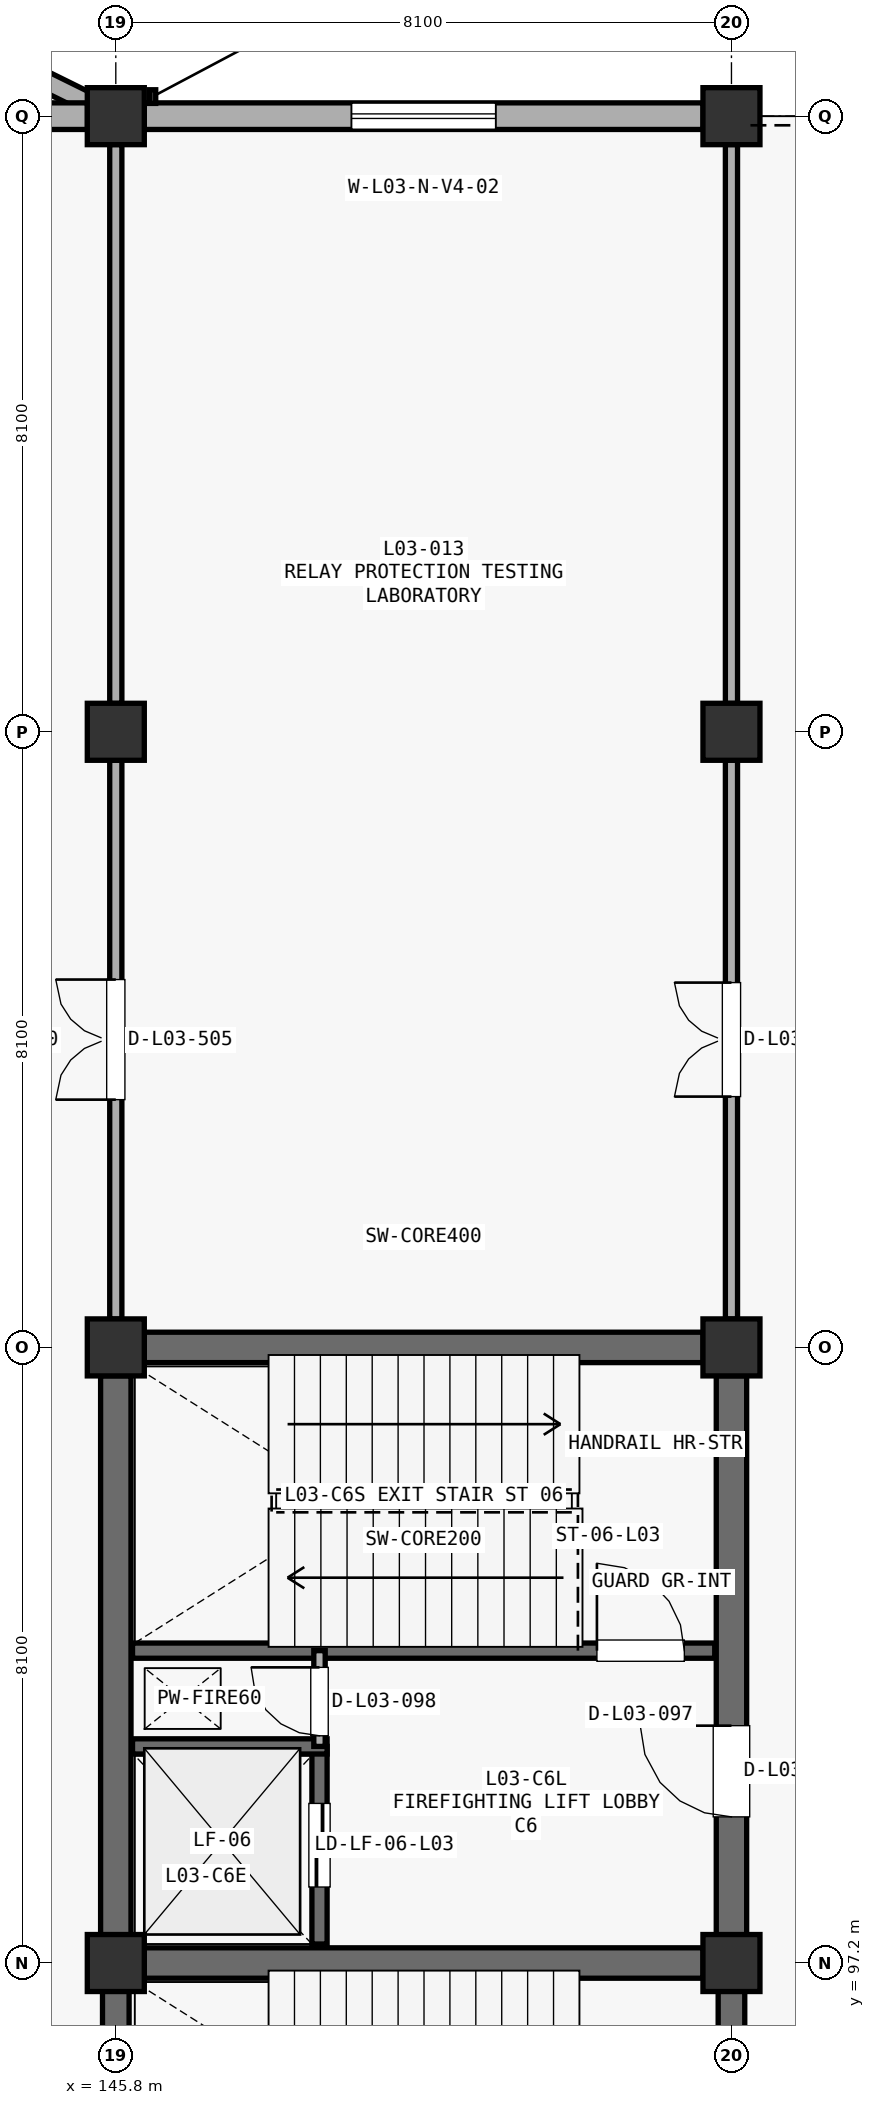
"""IFC4 building model, lengths in metres.
Left out: names, types, materials, properties, quantities, classifications, styles, units other than length and angle.
Written with IfcOpenShell. Run it as: python <this file> out.ifc"""

import sys

from ifc_helpers import new_model, si_unit, direction, frame, frame_2d, origin, origin_2d, place, context, subcontext, project, spatial, polyline, rectangle, outline, extrude, element, fill, save


model = new_model("IFC4")
c1 = context("Model", 3, precision=1e-05, world=origin(), true_north=direction((0.0, 1.0)))
c2 = subcontext(c1, "Body", "Model", "MODEL_VIEW")
j1 = project(units=[si_unit("LENGTHUNIT", "METRE"), si_unit("PLANEANGLEUNIT", "RADIAN")], contexts=[c1])
p1 = place(None, origin())
s1 = spatial("IfcSite", under=j1, at=p1, CompositionType="ELEMENT")
p2 = place(p1, origin())
s2 = spatial("IfcBuilding", under=s1, at=p2, CompositionType="ELEMENT")
p3 = place(p2, frame((0.0, 0.0, 14.11)))
s3 = spatial("IfcBuildingStorey", under=s2, at=p3, CompositionType="ELEMENT", Elevation=14.11)
for number, where, z_axis, x_axis in (
    (1, (145.8, 97.2, 0.0), (0.0, 0.0, 1.0), (1.0, 0.0, 0.0)),
    (2, (145.8, 105.3, 0.0), (0.0, 0.0, 1.0), (1.0, 0.0, 0.0)),
    (3, (145.8, 113.4, 0.0), (0.0, 0.0, 1.0), (1.0, 0.0, 0.0)),
    (4, (145.8, 121.5, 0.0), (0.0, 0.0, 1.0), (1.0, 0.0, 0.0)),
    (5, (153.9, 97.2, 0.0), (0.0, 0.0, 1.0), (1.0, 0.0, 0.0)),
    (6, (153.9, 105.3, 0.0), (0.0, 0.0, 1.0), (1.0, 0.0, 0.0)),
    (7, (153.9, 113.4, 0.0), (0.0, 0.0, 1.0), (1.0, 0.0, 0.0)),
    (8, (153.9, 121.5, 0.0), (0.0, 0.0, 1.0), (1.0, 0.0, 0.0)),
):
    element("IfcColumn", number, at=place(p3, frame(where, z_axis=z_axis, x_axis=x_axis)), inside=s3, PredefinedType="COLUMN", context=c2, shape_type="SweptSolid", body=[
        extrude(rectangle(XDim=0.75, YDim=0.75, at=origin_2d()), origin(), (0.0, 0.0, 1.0), 4.42),
    ])
p4 = place(p3, frame((137.718, 125.491, -0.35), z_axis=(0.0, 0.0, 1.0), x_axis=(0.89662055287, -0.442799711124, 0.0)))
e9 = element("IfcWall", 9, at=p4, inside=s3, PredefinedType="STANDARD", context=c2, shape_type="SweptSolid", body=[
    extrude(outline(polyline([(0.0, 0.0), (8.994, 0.0), (8.994, 0.36), (0.0, 1.969), (0.0, 0.0)])), frame((0.0, 0.13, 0.0), z_axis=(0.0, -1.0, 0.0), x_axis=(1.0, 0.0, 0.0)), (0.0, 0.0, 1.0), 0.26),
])
p5 = place(p3, frame((138.073, 121.5, 0.0), z_axis=(0.0, 0.0, 1.0), x_axis=(1.0, 0.0, 0.0)))
e10 = element("IfcWall", 10, at=p5, inside=s3, PredefinedType="STANDARD", context=c2, shape_type="SweptSolid", body=[
    extrude(rectangle(XDim=7.354, YDim=0.35, at=frame_2d((3.677, 0.0))), origin(), (0.0, 0.0, 1.0), 3.512),
])
p6 = place(p5, frame((2.227, 0.0, 0.85)))
e11 = element("IfcOpeningElement", 11, at=p6, cuts=e10, PredefinedType="OPENING", context=c2, shape_type="SweptSolid", body=[
    extrude(rectangle(XDim=2.9, YDim=1.6, at=frame_2d((1.45, 0.8))), frame((0.0, 0.185, 0.0), z_axis=(0.0, -1.0, 0.0), x_axis=(1.0, 0.0, 0.0)), (0.0, 0.0, 1.0), 0.37),
])
p7 = place(p3, frame((146.173, 121.5, 0.0), z_axis=(0.0, 0.0, 1.0), x_axis=(1.0, 0.0, 0.0)))
e12 = element("IfcWall", 12, at=p7, inside=s3, PredefinedType="STANDARD", context=c2, shape_type="SweptSolid", body=[
    extrude(rectangle(XDim=7.354, YDim=0.35, at=frame_2d((3.677, 0.0))), origin(), (0.0, 0.0, 1.0), 3.512),
])
p8 = place(p7, frame((2.727, 0.0, 0.85)))
e13 = element("IfcOpeningElement", 13, at=p8, cuts=e12, PredefinedType="OPENING", context=c2, shape_type="SweptSolid", body=[
    extrude(rectangle(XDim=1.9, YDim=1.85, at=frame_2d((0.95, 0.925))), frame((0.0, 0.185, 0.0), z_axis=(0.0, -1.0, 0.0), x_axis=(1.0, 0.0, 0.0)), (0.0, 0.0, 1.0), 0.37),
])
for number, where, z_axis, x_axis in (
    (14, (146.173, 105.3, 0.0), (0.0, 0.0, 1.0), (1.0, 0.0, 0.0)),
    (15, (145.8, 97.573, 0.0), (0.0, 0.0, 1.0), (0.0, 1.0, 0.0)),
):
    element("IfcWall", number, at=place(p3, frame(where, z_axis=z_axis, x_axis=x_axis)), inside=s3, PredefinedType="SHEAR", context=c2, shape_type="SweptSolid", body=[
        extrude(rectangle(XDim=7.354, YDim=0.4, at=frame_2d((3.677, 0.0))), origin(), (0.0, 0.0, 1.0), 4.162),
    ])
p9 = place(p3, frame((153.9, 97.573, 0.0), z_axis=(0.0, 0.0, 1.0), x_axis=(0.0, 1.0, 0.0)))
e16 = element("IfcWall", 16, at=p9, inside=s3, PredefinedType="SHEAR", context=c2, shape_type="SweptSolid", body=[
    extrude(rectangle(XDim=7.354, YDim=0.4, at=frame_2d((3.677, 0.0))), origin(), (0.0, 0.0, 1.0), 4.162),
])
p10 = place(p9, frame((1.55, 0.0, 0.0)))
e17 = element("IfcOpeningElement", 17, at=p10, cuts=e16, PredefinedType="OPENING", context=c2, shape_type="SweptSolid", body=[
    extrude(rectangle(XDim=1.2, YDim=2.2, at=frame_2d((0.6, 1.1))), frame((0.0, 0.21, 0.0), z_axis=(0.0, -1.0, 0.0), x_axis=(1.0, 0.0, 0.0)), (0.0, 0.0, 1.0), 0.42),
])
p11 = place(p3, frame((146.173, 97.2, 0.0), z_axis=(0.0, 0.0, 1.0), x_axis=(1.0, 0.0, 0.0)))
e18 = element("IfcWall", 18, at=p11, inside=s3, PredefinedType="SHEAR", context=c2, shape_type="SweptSolid", body=[
    extrude(rectangle(XDim=7.354, YDim=0.4, at=frame_2d((3.677, 0.0))), origin(), (0.0, 0.0, 1.0), 4.162),
])
p12 = place(p3, frame((146.02, 101.31, 0.0), z_axis=(0.0, 0.0, 1.0), x_axis=(1.0, 0.0, 0.0)))
e19 = element("IfcWall", 19, at=p12, inside=s3, PredefinedType="SHEAR", context=c2, shape_type="SweptSolid", body=[
    extrude(rectangle(XDim=7.66, YDim=0.2, at=frame_2d((3.83, 0.0))), origin(), (0.0, 0.0, 1.0), 4.162),
])
p13 = place(p12, frame((6.11, 0.0, 0.0)))
e20 = element("IfcOpeningElement", 20, at=p13, cuts=e19, PredefinedType="OPENING", context=c2, shape_type="SweptSolid", body=[
    extrude(rectangle(XDim=1.15, YDim=2.2, at=frame_2d((0.575, 1.1))), frame((0.0, 0.11, 0.0), z_axis=(0.0, -1.0, 0.0), x_axis=(1.0, 0.0, 0.0)), (0.0, 0.0, 1.0), 0.22),
])
p14 = place(p3, frame((148.48, 97.45, 0.0), z_axis=(0.0, 0.0, 1.0), x_axis=(0.0, 1.0, 0.0)))
e21 = element("IfcWall", 21, at=p14, inside=s3, PredefinedType="SHEAR", context=c2, shape_type="SweptSolid", body=[
    extrude(rectangle(XDim=2.6, YDim=0.2, at=frame_2d((1.3, 0.0))), origin(), (0.0, 0.0, 1.0), 4.162),
])
p15 = place(p14, frame((0.75, 0.0, 0.0)))
e22 = element("IfcOpeningElement", 22, at=p15, cuts=e21, PredefinedType="OPENING", context=c2, shape_type="SweptSolid", body=[
    extrude(rectangle(XDim=1.1, YDim=2.2, at=frame_2d((0.55, 1.1))), frame((0.0, 0.11, 0.0), z_axis=(0.0, -1.0, 0.0), x_axis=(1.0, 0.0, 0.0)), (0.0, 0.0, 1.0), 0.22),
])
p16 = place(p3, frame((146.02, 100.05, 0.0), z_axis=(0.0, 0.0, 1.0), x_axis=(1.0, 0.0, 0.0)))
e23 = element("IfcWall", 23, at=p16, inside=s3, PredefinedType="SHEAR", context=c2, shape_type="SweptSolid", body=[
    extrude(rectangle(XDim=2.56, YDim=0.2, at=frame_2d((1.28, 0.0))), origin(), (0.0, 0.0, 1.0), 4.162),
])
p17 = place(p3, frame((148.48, 100.05, 0.0), z_axis=(0.0, 0.0, 1.0), x_axis=(0.0, 1.0, 0.0)))
e24 = element("IfcWall", 24, at=p17, inside=s3, PredefinedType="PARTITIONING", context=c2, shape_type="SweptSolid", body=[
    extrude(rectangle(XDim=1.26, YDim=0.15, at=frame_2d((0.63, 0.0))), origin(), (0.0, 0.0, 1.0), 4.162),
])
p18 = place(p17, frame((0.14, 0.0, 0.0)))
e25 = element("IfcOpeningElement", 25, at=p18, cuts=e24, PredefinedType="OPENING", context=c2, shape_type="SweptSolid", body=[
    extrude(rectangle(XDim=0.9, YDim=2.15, at=frame_2d((0.45, 1.075))), frame((0.0, 0.085, 0.0), z_axis=(0.0, -1.0, 0.0), x_axis=(1.0, 0.0, 0.0)), (0.0, 0.0, 1.0), 0.17),
])
p19 = place(p3, frame((145.8, 89.473, 0.0), z_axis=(0.0, 0.0, 1.0), x_axis=(0.0, 1.0, 0.0)))
e26 = element("IfcWall", 26, at=p19, inside=s3, PredefinedType="SHEAR", context=c2, shape_type="SweptSolid", body=[
    extrude(rectangle(XDim=7.354, YDim=0.35, at=frame_2d((3.677, 0.0))), origin(), (0.0, 0.0, 1.0), 4.162),
])
p20 = place(p3, frame((153.9, 89.473, 0.0), z_axis=(0.0, 0.0, 1.0), x_axis=(0.0, 1.0, 0.0)))
e27 = element("IfcWall", 27, at=p20, inside=s3, PredefinedType="SHEAR", context=c2, shape_type="SweptSolid", body=[
    extrude(rectangle(XDim=7.354, YDim=0.35, at=frame_2d((3.677, 0.0))), origin(), (0.0, 0.0, 1.0), 4.162),
])
p21 = place(p20, frame((1.55, 0.0, 0.0)))
e28 = element("IfcOpeningElement", 28, at=p21, cuts=e27, PredefinedType="OPENING", context=c2, shape_type="SweptSolid", body=[
    extrude(rectangle(XDim=1.2, YDim=2.2, at=frame_2d((0.6, 1.1))), frame((0.0, 0.185, 0.0), z_axis=(0.0, -1.0, 0.0), x_axis=(1.0, 0.0, 0.0)), (0.0, 0.0, 1.0), 0.37),
])
p22 = place(p3, frame((145.8, 105.673, 0.0), z_axis=(0.0, 0.0, 1.0), x_axis=(0.0, 1.0, 0.0)))
e29 = element("IfcWall", 29, at=p22, inside=s3, PredefinedType="PARTITIONING", context=c2, shape_type="SweptSolid", body=[
    extrude(rectangle(XDim=7.354, YDim=0.16, at=frame_2d((3.677, 0.0))), origin(), (0.0, 0.0, 1.0), 3.312),
])
p23 = place(p22, frame((2.887, 0.0, 0.0)))
e30 = element("IfcOpeningElement", 30, at=p23, cuts=e29, PredefinedType="OPENING", context=c2, shape_type="SweptSolid", body=[
    extrude(rectangle(XDim=1.58, YDim=2.2, at=frame_2d((0.79, 1.1))), frame((0.0, 0.09, 0.0), z_axis=(0.0, -1.0, 0.0), x_axis=(1.0, 0.0, 0.0)), (0.0, 0.0, 1.0), 0.18),
])
p24 = place(p3, frame((145.8, 113.773, 0.0), z_axis=(0.0, 0.0, 1.0), x_axis=(0.0, 1.0, 0.0)))
e31 = element("IfcWall", 31, at=p24, inside=s3, PredefinedType="PARTITIONING", context=c2, shape_type="SweptSolid", body=[
    extrude(rectangle(XDim=7.354, YDim=0.16, at=frame_2d((3.677, 0.0))), origin(), (0.0, 0.0, 1.0), 3.212),
])
p25 = place(p3, frame((153.9, 105.673, 0.0), z_axis=(0.0, 0.0, 1.0), x_axis=(0.0, 1.0, 0.0)))
e32 = element("IfcWall", 32, at=p25, inside=s3, PredefinedType="PARTITIONING", context=c2, shape_type="SweptSolid", body=[
    extrude(rectangle(XDim=7.354, YDim=0.16, at=frame_2d((3.677, 0.0))), origin(), (0.0, 0.0, 1.0), 3.412),
])
p26 = place(p25, frame((2.927, 0.0, 0.0)))
e33 = element("IfcOpeningElement", 33, at=p26, cuts=e32, PredefinedType="OPENING", context=c2, shape_type="SweptSolid", body=[
    extrude(rectangle(XDim=1.5, YDim=2.2, at=frame_2d((0.75, 1.1))), frame((0.0, 0.09, 0.0), z_axis=(0.0, -1.0, 0.0), x_axis=(1.0, 0.0, 0.0)), (0.0, 0.0, 1.0), 0.18),
])
p27 = place(p3, frame((153.9, 113.773, 0.0), z_axis=(0.0, 0.0, 1.0), x_axis=(0.0, 1.0, 0.0)))
e34 = element("IfcWall", 34, at=p27, inside=s3, PredefinedType="PARTITIONING", context=c2, shape_type="SweptSolid", body=[
    extrude(rectangle(XDim=7.354, YDim=0.16, at=frame_2d((3.677, 0.0))), origin(), (0.0, 0.0, 1.0), 3.512),
])
p28 = place(p8, origin())
e35 = element("IfcWindow", 35, at=p28, inside=s3, PartitioningType="SINGLE_PANEL", PredefinedType="WINDOW", context=c2, shape_type="SweptSolid", body=[
    extrude(rectangle(XDim=1.9, YDim=1.85, at=frame_2d((0.95, 0.925))), frame((0.0, 0.03, 0.0), z_axis=(0.0, -1.0, 0.0), x_axis=(1.0, 0.0, 0.0)), (0.0, 0.0, 1.0), 0.06),
])
fill(e13, e35)
p29 = place(p10, origin())
e36 = element("IfcDoor", 36, at=p29, inside=s3, OperationType="SINGLE_SWING_RIGHT", PredefinedType="DOOR", context=c2, shape_type="SweptSolid", body=[
    extrude(rectangle(XDim=1.2, YDim=2.2, at=frame_2d((0.6, 1.1))), frame((0.0, 0.025, 0.0), z_axis=(0.0, -1.0, 0.0), x_axis=(1.0, 0.0, 0.0)), (0.0, 0.0, 1.0), 0.05),
])
fill(e17, e36)
p30 = place(p13, origin())
e37 = element("IfcDoor", 37, at=p30, inside=s3, OperationType="SINGLE_SWING_LEFT", PredefinedType="DOOR", context=c2, shape_type="SweptSolid", body=[
    extrude(rectangle(XDim=1.15, YDim=2.2, at=frame_2d((0.575, 1.1))), frame((0.0, 0.025, 0.0), z_axis=(0.0, -1.0, 0.0), x_axis=(1.0, 0.0, 0.0)), (0.0, 0.0, 1.0), 0.05),
])
fill(e20, e37)
p31 = place(p15, origin())
e38 = element("IfcDoor", 38, at=p31, inside=s3, OperationType="SLIDING_TO_LEFT", PredefinedType="DOOR", context=c2, shape_type="SweptSolid", body=[
    extrude(rectangle(XDim=1.1, YDim=2.2, at=frame_2d((0.55, 1.1))), frame((0.0, 0.025, 0.0), z_axis=(0.0, -1.0, 0.0), x_axis=(1.0, 0.0, 0.0)), (0.0, 0.0, 1.0), 0.05),
])
fill(e22, e38)
p32 = place(p18, origin())
e39 = element("IfcDoor", 39, at=p32, inside=s3, OperationType="SINGLE_SWING_RIGHT", PredefinedType="DOOR", context=c2, shape_type="SweptSolid", body=[
    extrude(rectangle(XDim=0.9, YDim=2.15, at=frame_2d((0.45, 1.075))), frame((0.0, 0.025, 0.0), z_axis=(0.0, -1.0, 0.0), x_axis=(1.0, 0.0, 0.0)), (0.0, 0.0, 1.0), 0.05),
])
fill(e25, e39)
p33 = place(p23, origin())
e40 = element("IfcDoor", 40, at=p33, inside=s3, OperationType="DOUBLE_SWING_LEFT", PredefinedType="DOOR", context=c2, shape_type="SweptSolid", body=[
    extrude(rectangle(XDim=1.58, YDim=2.2, at=frame_2d((0.79, 1.1))), frame((0.0, 0.025, 0.0), z_axis=(0.0, -1.0, 0.0), x_axis=(1.0, 0.0, 0.0)), (0.0, 0.0, 1.0), 0.05),
])
fill(e30, e40)
p34 = place(p26, origin())
e41 = element("IfcDoor", 41, at=p34, inside=s3, OperationType="DOUBLE_SWING_LEFT", PredefinedType="DOOR", context=c2, shape_type="SweptSolid", body=[
    extrude(rectangle(XDim=1.5, YDim=2.2, at=frame_2d((0.75, 1.1))), frame((0.0, 0.025, 0.0), z_axis=(0.0, -1.0, 0.0), x_axis=(1.0, 0.0, 0.0)), (0.0, 0.0, 1.0), 0.05),
])
fill(e33, e41)
save(model, sys.argv[1])
